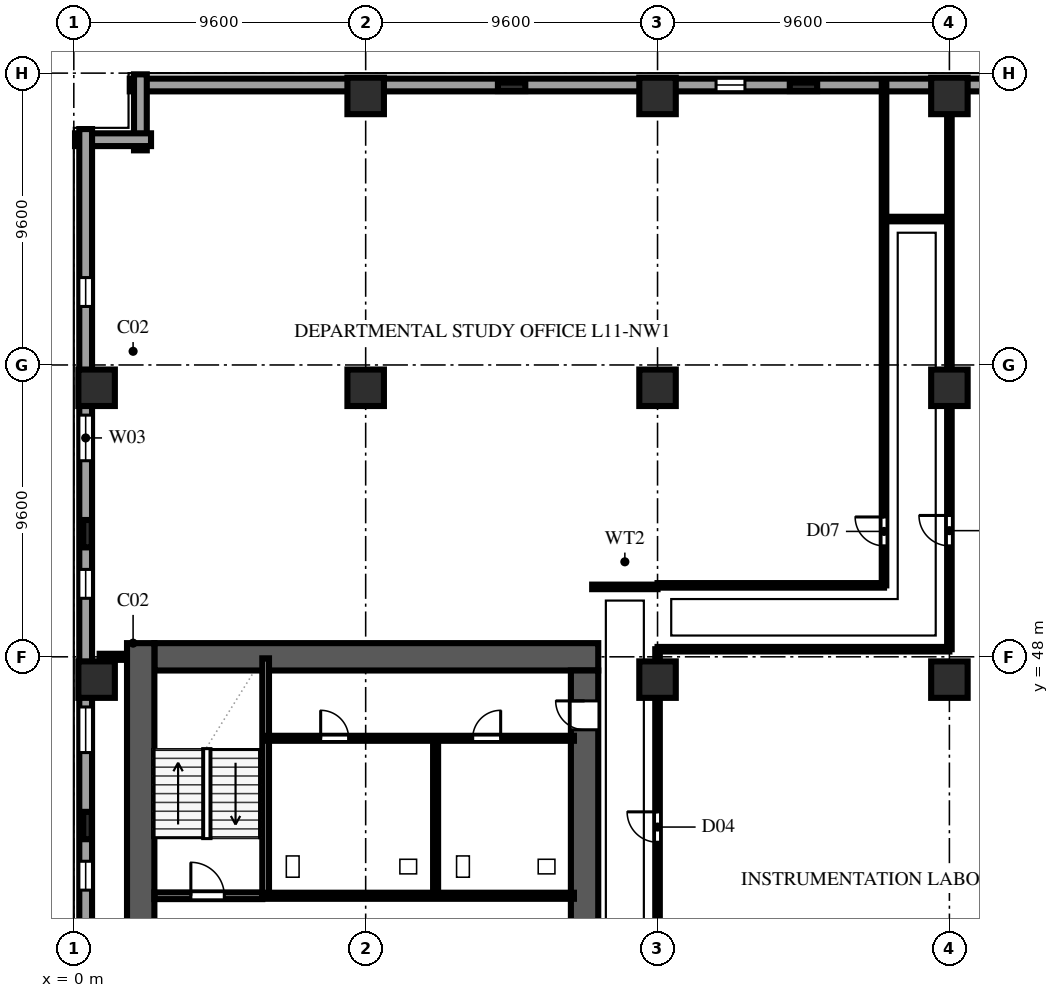
"""IFC4 building model, lengths in metres.
Left out: names, types, materials, properties, quantities, classifications, styles, units other than length and angle.
Written with IfcOpenShell. Run it as: python <this file> out.ifc"""

import sys

from ifc_helpers import new_model, si_unit, direction, frame, frame_2d, origin, origin_2d, place, context, subcontext, project, spatial, rectangle, extrude, element, fill, save


model = new_model("IFC4")
c1 = context("Model", 3, precision=1e-05, world=origin(), true_north=direction((0.0, 1.0)))
c2 = subcontext(c1, "Body", "Model", "MODEL_VIEW")
j1 = project(units=[si_unit("LENGTHUNIT", "METRE"), si_unit("PLANEANGLEUNIT", "RADIAN")], contexts=[c1])
p1 = place(None, origin())
s1 = spatial("IfcSite", under=j1, at=p1, CompositionType="ELEMENT")
p2 = place(p1, origin())
s2 = spatial("IfcBuilding", under=s1, at=p2, CompositionType="ELEMENT")
p3 = place(p2, frame((0.0, 0.0, 47.0)))
s3 = spatial("IfcBuildingStorey", under=s2, at=p3, CompositionType="ELEMENT", Elevation=47.0)
p4 = place(p3, frame((2.65, 48.0, 0.0), z_axis=(0.0, 0.0, 1.0), x_axis=(1.0, 0.0, 0.0)))
e1 = element("IfcWall", 1, at=p4, inside=s3, PredefinedType="SHEAR", context=c2, shape_type="SweptSolid", body=[
    extrude(rectangle(XDim=14.6, YDim=0.9, at=frame_2d((7.3, 0.0))), origin(), (0.0, 0.0, 1.0), 3.54),
])
p5 = place(p3, frame((2.2, 9.15, 0.0), z_axis=(0.0, 0.0, 1.0), x_axis=(0.0, 1.0, 0.0)))
e2 = element("IfcWall", 2, at=p5, inside=s3, PredefinedType="SHEAR", context=c2, shape_type="SweptSolid", body=[
    extrude(rectangle(XDim=39.3, YDim=0.9, at=frame_2d((19.65, 0.0))), origin(), (0.0, 0.0, 1.0), 3.54),
])
p6 = place(p3, frame((16.8, 36.4, 0.0), z_axis=(0.0, 0.0, 1.0), x_axis=(0.0, 1.0, 0.0)))
e3 = element("IfcWall", 3, at=p6, inside=s3, PredefinedType="SHEAR", context=c2, shape_type="SweptSolid", body=[
    extrude(rectangle(XDim=11.15, YDim=0.9, at=frame_2d((5.575, 0.0))), origin(), (0.0, 0.0, 1.0), 3.54),
])
p7 = place(p6, frame((9.2, 0.0, 0.0)))
e4 = element("IfcOpeningElement", 4, at=p7, cuts=e3, PredefinedType="OPENING", context=c2, shape_type="SweptSolid", body=[
    extrude(rectangle(XDim=0.95, YDim=2.15, at=frame_2d((0.475, 1.075))), frame((0.0, 0.462, 0.0), z_axis=(0.0, -1.0, 0.0), x_axis=(1.0, 0.0, 0.0)), (0.0, 0.0, 1.0), 0.924),
])
for number, where, z_axis, x_axis in (
    (5, (0.75, 47.25, 0.0), (0.0, 0.0, 1.0), (1.0, 0.0, 0.0)),
    (6, (0.75, 56.85, 0.0), (0.0, 0.0, 1.0), (1.0, 0.0, 0.0)),
    (7, (9.6, 56.85, 0.0), (0.0, 0.0, 1.0), (1.0, 0.0, 0.0)),
    (8, (9.6, 66.45, 0.0), (0.0, 0.0, 1.0), (1.0, 0.0, 0.0)),
    (9, (19.2, 47.25, 0.0), (0.0, 0.0, 1.0), (1.0, 0.0, 0.0)),
    (10, (19.2, 56.85, 0.0), (0.0, 0.0, 1.0), (1.0, 0.0, 0.0)),
    (11, (19.2, 66.45, 0.0), (0.0, 0.0, 1.0), (1.0, 0.0, 0.0)),
    (12, (28.8, 47.25, 0.0), (0.0, 0.0, 1.0), (1.0, 0.0, 0.0)),
    (13, (28.8, 56.85, 0.0), (0.0, 0.0, 1.0), (1.0, 0.0, 0.0)),
    (14, (28.8, 66.45, 0.0), (0.0, 0.0, 1.0), (1.0, 0.0, 0.0)),
):
    element("IfcColumn", number, at=place(p3, frame(where, z_axis=z_axis, x_axis=x_axis)), inside=s3, PredefinedType="COLUMN", context=c2, shape_type="SweptSolid", body=[
        extrude(rectangle(XDim=1.2, YDim=1.2, at=origin_2d()), origin(), (0.0, 0.0, 1.0), 3.8),
    ])
for number, where, z_axis, x_axis in (
    (15, (0.45, 42.45, 0.0), (0.0, 0.0, 1.0), (0.0, 1.0, 0.0)),
    (16, (0.45, 52.05, 0.0), (0.0, 0.0, 1.0), (0.0, 1.0, 0.0)),
    (17, (14.4, 66.75, 0.0), (0.0, 0.0, 1.0), (1.0, 0.0, 0.0)),
    (18, (24.0, 66.75, 0.0), (0.0, 0.0, 1.0), (1.0, 0.0, 0.0)),
):
    element("IfcColumn", number, at=place(p3, frame(where, z_axis=z_axis, x_axis=x_axis)), inside=s3, PredefinedType="PILASTER", context=c2, shape_type="SweptSolid", body=[
        extrude(rectangle(XDim=0.9, YDim=0.28, at=origin_2d()), origin(), (0.0, 0.0, 1.0), 3.8),
    ])
p8 = place(p3, frame((36.56, 66.81, 0.0), z_axis=(0.0, 0.0, 1.0), x_axis=(-1.0, 0.0, 0.0)))
e19 = element("IfcWall", 19, at=p8, inside=s3, PredefinedType="SOLIDWALL", context=c2, shape_type="SweptSolid", body=[
    extrude(rectangle(XDim=34.72, YDim=0.42, at=frame_2d((17.36, 0.0))), origin(), (0.0, 0.0, 1.0), 3.54),
])
p9 = place(p8, frame((4.885, 0.0, 0.9)))
e20 = element("IfcOpeningElement", 20, at=p9, cuts=e19, PredefinedType="OPENING", context=c2, shape_type="SweptSolid", body=[
    extrude(rectangle(XDim=0.95, YDim=1.85, at=frame_2d((0.475, 0.925))), frame((0.0, 0.222, 0.0), z_axis=(0.0, -1.0, 0.0), x_axis=(1.0, 0.0, 0.0)), (0.0, 0.0, 1.0), 0.444),
])
p10 = place(p8, frame((14.485, 0.0, 0.9)))
e21 = element("IfcOpeningElement", 21, at=p10, cuts=e19, PredefinedType="OPENING", context=c2, shape_type="SweptSolid", body=[
    extrude(rectangle(XDim=0.95, YDim=1.85, at=frame_2d((0.475, 0.925))), frame((0.0, 0.222, 0.0), z_axis=(0.0, -1.0, 0.0), x_axis=(1.0, 0.0, 0.0)), (0.0, 0.0, 1.0), 0.444),
])
for number, where, z_axis, x_axis in (
    (22, (2.19, 67.16, 0.0), (0.0, 0.0, 1.0), (0.0, -1.0, 0.0)),
    (23, (2.54, 65.01, 0.0), (0.0, 0.0, 1.0), (-1.0, 0.0, 0.0)),
):
    element("IfcWall", number, at=place(p3, frame(where, z_axis=z_axis, x_axis=x_axis)), inside=s3, PredefinedType="SOLIDWALL", context=c2, shape_type="SweptSolid", body=[
        extrude(rectangle(XDim=2.5, YDim=0.42, at=frame_2d((1.25, 0.0))), origin(), (0.0, 0.0, 1.0), 3.54),
    ])
p11 = place(p3, frame((0.39, 65.36, 0.0), z_axis=(0.0, 0.0, 1.0), x_axis=(0.0, -1.0, 0.0)))
e24 = element("IfcWall", 24, at=p11, inside=s3, PredefinedType="SOLIDWALL", context=c2, shape_type="SweptSolid", body=[
    extrude(rectangle(XDim=63.52, YDim=0.42, at=frame_2d((31.76, 0.0))), origin(), (0.0, 0.0, 1.0), 3.54),
])
p12 = place(p11, frame((4.885, 0.0, 0.9)))
e25 = element("IfcOpeningElement", 25, at=p12, cuts=e24, PredefinedType="OPENING", context=c2, shape_type="SweptSolid", body=[
    extrude(rectangle(XDim=0.95, YDim=1.85, at=frame_2d((0.475, 0.925))), frame((0.0, 0.222, 0.0), z_axis=(0.0, -1.0, 0.0), x_axis=(1.0, 0.0, 0.0)), (0.0, 0.0, 1.0), 0.444),
])
p13 = place(p11, frame((9.41, 0.0, 0.9)))
e26 = element("IfcOpeningElement", 26, at=p13, cuts=e24, PredefinedType="OPENING", context=c2, shape_type="SweptSolid", body=[
    extrude(rectangle(XDim=1.5, YDim=1.85, at=frame_2d((0.75, 0.925))), frame((0.0, 0.222, 0.0), z_axis=(0.0, -1.0, 0.0), x_axis=(1.0, 0.0, 0.0)), (0.0, 0.0, 1.0), 0.444),
])
p14 = place(p11, frame((14.485, 0.0, 0.9)))
e27 = element("IfcOpeningElement", 27, at=p14, cuts=e24, PredefinedType="OPENING", context=c2, shape_type="SweptSolid", body=[
    extrude(rectangle(XDim=0.95, YDim=1.85, at=frame_2d((0.475, 0.925))), frame((0.0, 0.222, 0.0), z_axis=(0.0, -1.0, 0.0), x_axis=(1.0, 0.0, 0.0)), (0.0, 0.0, 1.0), 0.444),
])
p15 = place(p11, frame((19.01, 0.0, 0.9)))
e28 = element("IfcOpeningElement", 28, at=p15, cuts=e24, PredefinedType="OPENING", context=c2, shape_type="SweptSolid", body=[
    extrude(rectangle(XDim=1.5, YDim=1.85, at=frame_2d((0.75, 0.925))), frame((0.0, 0.222, 0.0), z_axis=(0.0, -1.0, 0.0), x_axis=(1.0, 0.0, 0.0)), (0.0, 0.0, 1.0), 0.444),
])
p16 = place(p11, frame((24.085, 0.0, 0.9)))
e29 = element("IfcOpeningElement", 29, at=p16, cuts=e24, PredefinedType="OPENING", context=c2, shape_type="SweptSolid", body=[
    extrude(rectangle(XDim=0.95, YDim=1.85, at=frame_2d((0.475, 0.925))), frame((0.0, 0.222, 0.0), z_axis=(0.0, -1.0, 0.0), x_axis=(1.0, 0.0, 0.0)), (0.0, 0.0, 1.0), 0.444),
])
p17 = place(p11, frame((28.61, 0.0, 0.9)))
e30 = element("IfcOpeningElement", 30, at=p17, cuts=e24, PredefinedType="OPENING", context=c2, shape_type="SweptSolid", body=[
    extrude(rectangle(XDim=1.5, YDim=1.85, at=frame_2d((0.75, 0.925))), frame((0.0, 0.222, 0.0), z_axis=(0.0, -1.0, 0.0), x_axis=(1.0, 0.0, 0.0)), (0.0, 0.0, 1.0), 0.444),
])
p18 = place(p11, frame((33.685, 0.0, 0.9)))
e31 = element("IfcOpeningElement", 31, at=p18, cuts=e24, PredefinedType="OPENING", context=c2, shape_type="SweptSolid", body=[
    extrude(rectangle(XDim=0.95, YDim=1.85, at=frame_2d((0.475, 0.925))), frame((0.0, 0.222, 0.0), z_axis=(0.0, -1.0, 0.0), x_axis=(1.0, 0.0, 0.0)), (0.0, 0.0, 1.0), 0.444),
])
p19 = place(p11, frame((38.21, 0.0, 0.9)))
e32 = element("IfcOpeningElement", 32, at=p19, cuts=e24, PredefinedType="OPENING", context=c2, shape_type="SweptSolid", body=[
    extrude(rectangle(XDim=1.5, YDim=1.85, at=frame_2d((0.75, 0.925))), frame((0.0, 0.222, 0.0), z_axis=(0.0, -1.0, 0.0), x_axis=(1.0, 0.0, 0.0)), (0.0, 0.0, 1.0), 0.444),
])
p20 = place(p11, frame((43.285, 0.0, 0.9)))
e33 = element("IfcOpeningElement", 33, at=p20, cuts=e24, PredefinedType="OPENING", context=c2, shape_type="SweptSolid", body=[
    extrude(rectangle(XDim=0.95, YDim=1.85, at=frame_2d((0.475, 0.925))), frame((0.0, 0.222, 0.0), z_axis=(0.0, -1.0, 0.0), x_axis=(1.0, 0.0, 0.0)), (0.0, 0.0, 1.0), 0.444),
])
p21 = place(p11, frame((47.81, 0.0, 0.9)))
e34 = element("IfcOpeningElement", 34, at=p21, cuts=e24, PredefinedType="OPENING", context=c2, shape_type="SweptSolid", body=[
    extrude(rectangle(XDim=1.5, YDim=1.85, at=frame_2d((0.75, 0.925))), frame((0.0, 0.222, 0.0), z_axis=(0.0, -1.0, 0.0), x_axis=(1.0, 0.0, 0.0)), (0.0, 0.0, 1.0), 0.444),
])
p22 = place(p11, frame((52.885, 0.0, 0.9)))
e35 = element("IfcOpeningElement", 35, at=p22, cuts=e24, PredefinedType="OPENING", context=c2, shape_type="SweptSolid", body=[
    extrude(rectangle(XDim=0.95, YDim=1.85, at=frame_2d((0.475, 0.925))), frame((0.0, 0.222, 0.0), z_axis=(0.0, -1.0, 0.0), x_axis=(1.0, 0.0, 0.0)), (0.0, 0.0, 1.0), 0.444),
])
p23 = place(p3, frame((2.65, 40.14, 0.0), z_axis=(0.0, 0.0, 1.0), x_axis=(1.0, 0.0, 0.0)))
e36 = element("IfcWall", 36, at=p23, inside=s3, PredefinedType="SOLIDWALL", context=c2, shape_type="SweptSolid", body=[
    extrude(rectangle(XDim=3.55, YDim=0.22, at=frame_2d((1.775, 0.0))), origin(), (0.0, 0.0, 1.0), 3.54),
])
p24 = place(p23, frame((1.2, 0.0, 0.0)))
e37 = element("IfcOpeningElement", 37, at=p24, cuts=e36, PredefinedType="OPENING", context=c2, shape_type="SweptSolid", body=[
    extrude(rectangle(XDim=1.1, YDim=2.2, at=frame_2d((0.55, 1.1))), frame((0.0, 0.122, 0.0), z_axis=(0.0, -1.0, 0.0), x_axis=(1.0, 0.0, 0.0)), (0.0, 0.0, 1.0), 0.244),
])
p25 = place(p3, frame((6.31, 40.14, 0.0), z_axis=(0.0, 0.0, 1.0), x_axis=(0.0, 1.0, 0.0)))
e38 = element("IfcWall", 38, at=p25, inside=s3, PredefinedType="SOLIDWALL", context=c2, shape_type="SweptSolid", body=[
    extrude(rectangle(XDim=7.81, YDim=0.22, at=frame_2d((3.905, 0.0))), origin(), (0.0, 0.0, 1.0), 3.54),
])
p26 = place(p3, frame((6.32, 40.14, 0.0), z_axis=(0.0, 0.0, 1.0), x_axis=(1.0, 0.0, 0.0)))
e39 = element("IfcWall", 39, at=p26, inside=s3, PredefinedType="SOLIDWALL", context=c2, shape_type="SweptSolid", body=[
    extrude(rectangle(XDim=10.13, YDim=0.2, at=frame_2d((5.065, 0.0))), origin(), (0.0, 0.0, 1.0), 3.54),
])
p27 = place(p3, frame((6.32, 45.32, 0.0), z_axis=(0.0, 0.0, 1.0), x_axis=(1.0, 0.0, 0.0)))
e40 = element("IfcWall", 40, at=p27, inside=s3, PredefinedType="PLUMBINGWALL", context=c2, shape_type="SweptSolid", body=[
    extrude(rectangle(XDim=10.13, YDim=0.165, at=frame_2d((5.065, 0.0))), origin(), (0.0, 0.0, 1.0), 3.54),
])
p28 = place(p27, frame((1.8, 0.0, 0.0)))
e41 = element("IfcOpeningElement", 41, at=p28, cuts=e40, PredefinedType="OPENING", context=c2, shape_type="SweptSolid", body=[
    extrude(rectangle(XDim=0.92, YDim=2.15, at=frame_2d((0.46, 1.075))), frame((0.0, 0.094, 0.0), z_axis=(0.0, -1.0, 0.0), x_axis=(1.0, 0.0, 0.0)), (0.0, 0.0, 1.0), 0.189),
])
p29 = place(p27, frame((6.8, 0.0, 0.0)))
e42 = element("IfcOpeningElement", 42, at=p29, cuts=e40, PredefinedType="OPENING", context=c2, shape_type="SweptSolid", body=[
    extrude(rectangle(XDim=0.92, YDim=2.15, at=frame_2d((0.46, 1.075))), frame((0.0, 0.094, 0.0), z_axis=(0.0, -1.0, 0.0), x_axis=(1.0, 0.0, 0.0)), (0.0, 0.0, 1.0), 0.189),
])
p30 = place(p3, frame((11.9, 40.4, 0.0), z_axis=(0.0, 0.0, 1.0), x_axis=(0.0, 1.0, 0.0)))
e43 = element("IfcWall", 43, at=p30, inside=s3, PredefinedType="PLUMBINGWALL", context=c2, shape_type="SweptSolid", body=[
    extrude(rectangle(XDim=4.92, YDim=0.165, at=frame_2d((2.46, 0.0))), origin(), (0.0, 0.0, 1.0), 3.54),
])
p31 = place(p3, frame((0.85, 48.0, 0.0), z_axis=(0.0, 0.0, 1.0), x_axis=(1.0, 0.0, 0.0)))
e44 = element("IfcWall", 44, at=p31, inside=s3, PredefinedType="SOLIDWALL", context=c2, shape_type="SweptSolid", body=[
    extrude(rectangle(XDim=0.895, YDim=0.2, at=frame_2d((0.448, 0.0))), origin(), (0.0, 0.0, 1.0), 3.54),
])
p32 = place(p3, frame((17.05, 50.3, 0.0), z_axis=(0.0, 0.0, 1.0), x_axis=(1.0, 0.0, 0.0)))
e45 = element("IfcWall", 45, at=p32, inside=s3, PredefinedType="PARTITIONING", context=c2, shape_type="SweptSolid", body=[
    extrude(rectangle(XDim=2.15, YDim=0.15, at=frame_2d((1.075, 0.0))), origin(), (0.0, 0.0, 1.0), 3.54),
])
p33 = place(p3, frame((19.2, 33.05, 0.0), z_axis=(0.0, 0.0, 1.0), x_axis=(0.0, 1.0, 0.0)))
e46 = element("IfcWall", 46, at=p33, inside=s3, PredefinedType="PARTITIONING", context=c2, shape_type="SweptSolid", body=[
    extrude(rectangle(XDim=15.2, YDim=0.15, at=frame_2d((7.6, 0.0))), origin(), (0.0, 0.0, 1.0), 3.184),
])
p34 = place(p33, frame((8.85, 0.0, 0.0)))
e47 = element("IfcOpeningElement", 47, at=p34, cuts=e46, PredefinedType="OPENING", context=c2, shape_type="SweptSolid", body=[
    extrude(rectangle(XDim=1.0, YDim=2.2, at=frame_2d((0.5, 1.1))), frame((0.0, 0.087, 0.0), z_axis=(0.0, -1.0, 0.0), x_axis=(1.0, 0.0, 0.0)), (0.0, 0.0, 1.0), 0.174),
])
p35 = place(p3, frame((19.2, 48.25, 0.0), z_axis=(0.0, 0.0, 1.0), x_axis=(1.0, 0.0, 0.0)))
e48 = element("IfcWall", 48, at=p35, inside=s3, PredefinedType="PARTITIONING", context=c2, shape_type="SweptSolid", body=[
    extrude(rectangle(XDim=9.6, YDim=0.15, at=frame_2d((4.8, 0.0))), origin(), (0.0, 0.0, 1.0), 3.54),
])
p36 = place(p3, frame((19.2, 50.35, 0.0), z_axis=(0.0, 0.0, 1.0), x_axis=(1.0, 0.0, 0.0)))
e49 = element("IfcWall", 49, at=p36, inside=s3, PredefinedType="PARTITIONING", context=c2, shape_type="SweptSolid", body=[
    extrude(rectangle(XDim=7.45, YDim=0.15, at=frame_2d((3.725, 0.0))), origin(), (0.0, 0.0, 1.0), 3.54),
])
p37 = place(p3, frame((26.65, 62.4, 0.0), z_axis=(0.0, 0.0, 1.0), x_axis=(1.0, 0.0, 0.0)))
e50 = element("IfcWall", 50, at=p37, inside=s3, PredefinedType="PARTITIONING", context=c2, shape_type="SweptSolid", body=[
    extrude(rectangle(XDim=2.15, YDim=0.15, at=frame_2d((1.075, 0.0))), origin(), (0.0, 0.0, 1.0), 3.54),
])
p38 = place(p3, frame((28.8, 48.25, 0.0), z_axis=(0.0, 0.0, 1.0), x_axis=(0.0, 1.0, 0.0)))
e51 = element("IfcWall", 51, at=p38, inside=s3, PredefinedType="PARTITIONING", context=c2, shape_type="SweptSolid", body=[
    extrude(rectangle(XDim=18.2, YDim=0.15, at=frame_2d((9.1, 0.0))), origin(), (0.0, 0.0, 1.0), 3.184),
])
p39 = place(p38, frame((3.4, 0.0, 0.0)))
e52 = element("IfcOpeningElement", 52, at=p39, cuts=e51, PredefinedType="OPENING", context=c2, shape_type="SweptSolid", body=[
    extrude(rectangle(XDim=1.0, YDim=2.2, at=frame_2d((0.5, 1.1))), frame((0.0, 0.087, 0.0), z_axis=(0.0, -1.0, 0.0), x_axis=(1.0, 0.0, 0.0)), (0.0, 0.0, 1.0), 0.174),
])
p40 = place(p3, frame((28.8, 66.45, 0.0), z_axis=(0.0, 0.0, 1.0), x_axis=(0.0, 1.0, 0.0)))
e53 = element("IfcWall", 53, at=p40, inside=s3, PredefinedType="PARTITIONING", context=c2, shape_type="SweptSolid", body=[
    extrude(rectangle(XDim=0.53, YDim=0.15, at=frame_2d((0.265, 0.0))), origin(), (0.0, 0.0, 1.0), 3.54),
])
p41 = place(p3, frame((26.65, 50.35, 0.0), z_axis=(0.0, 0.0, 1.0), x_axis=(0.0, 1.0, 0.0)))
e54 = element("IfcWall", 54, at=p41, inside=s3, PredefinedType="PARTITIONING", context=c2, shape_type="SweptSolid", body=[
    extrude(rectangle(XDim=16.63, YDim=0.15, at=frame_2d((8.315, 0.0))), origin(), (0.0, 0.0, 1.0), 3.54),
])
p42 = place(p41, frame((1.3, 0.0, 0.0)))
e55 = element("IfcOpeningElement", 55, at=p42, cuts=e54, PredefinedType="OPENING", context=c2, shape_type="SweptSolid", body=[
    extrude(rectangle(XDim=0.95, YDim=2.15, at=frame_2d((0.475, 1.075))), frame((0.0, 0.087, 0.0), z_axis=(0.0, -1.0, 0.0), x_axis=(1.0, 0.0, 0.0)), (0.0, 0.0, 1.0), 0.174),
])
p43 = place(p10, origin())
e56 = element("IfcWindow", 56, at=p43, inside=s3, PartitioningType="SINGLE_PANEL", PredefinedType="WINDOW", context=c2, shape_type="SweptSolid", body=[
    extrude(rectangle(XDim=0.95, YDim=1.85, at=frame_2d((0.475, 0.925))), frame((0.0, 0.11, 0.0), z_axis=(0.0, -1.0, 0.0), x_axis=(1.0, 0.0, 0.0)), (0.0, 0.0, 1.0), 0.06),
])
fill(e21, e56)
p44 = place(p12, origin())
e57 = element("IfcWindow", 57, at=p44, inside=s3, PartitioningType="SINGLE_PANEL", PredefinedType="WINDOW", context=c2, shape_type="SweptSolid", body=[
    extrude(rectangle(XDim=0.95, YDim=1.85, at=frame_2d((0.475, 0.925))), frame((0.0, 0.11, 0.0), z_axis=(0.0, -1.0, 0.0), x_axis=(1.0, 0.0, 0.0)), (0.0, 0.0, 1.0), 0.06),
])
fill(e25, e57)
p45 = place(p13, origin())
e58 = element("IfcWindow", 58, at=p45, inside=s3, PartitioningType="DOUBLE_PANEL_VERTICAL", PredefinedType="WINDOW", context=c2, shape_type="SweptSolid", body=[
    extrude(rectangle(XDim=1.5, YDim=1.85, at=frame_2d((0.75, 0.925))), frame((0.0, 0.11, 0.0), z_axis=(0.0, -1.0, 0.0), x_axis=(1.0, 0.0, 0.0)), (0.0, 0.0, 1.0), 0.06),
])
fill(e26, e58)
p46 = place(p14, origin())
e59 = element("IfcWindow", 59, at=p46, inside=s3, PartitioningType="SINGLE_PANEL", PredefinedType="WINDOW", context=c2, shape_type="SweptSolid", body=[
    extrude(rectangle(XDim=0.95, YDim=1.85, at=frame_2d((0.475, 0.925))), frame((0.0, 0.11, 0.0), z_axis=(0.0, -1.0, 0.0), x_axis=(1.0, 0.0, 0.0)), (0.0, 0.0, 1.0), 0.06),
])
fill(e27, e59)
p47 = place(p15, origin())
e60 = element("IfcWindow", 60, at=p47, inside=s3, PartitioningType="DOUBLE_PANEL_VERTICAL", PredefinedType="WINDOW", context=c2, shape_type="SweptSolid", body=[
    extrude(rectangle(XDim=1.5, YDim=1.85, at=frame_2d((0.75, 0.925))), frame((0.0, 0.11, 0.0), z_axis=(0.0, -1.0, 0.0), x_axis=(1.0, 0.0, 0.0)), (0.0, 0.0, 1.0), 0.06),
])
fill(e28, e60)
p48 = place(p16, origin())
e61 = element("IfcWindow", 61, at=p48, inside=s3, PartitioningType="SINGLE_PANEL", PredefinedType="WINDOW", context=c2, shape_type="SweptSolid", body=[
    extrude(rectangle(XDim=0.95, YDim=1.85, at=frame_2d((0.475, 0.925))), frame((0.0, 0.11, 0.0), z_axis=(0.0, -1.0, 0.0), x_axis=(1.0, 0.0, 0.0)), (0.0, 0.0, 1.0), 0.06),
])
fill(e29, e61)
p49 = place(p24, origin())
e62 = element("IfcDoor", 62, at=p49, inside=s3, OperationType="SINGLE_SWING_LEFT", PredefinedType="DOOR", context=c2, shape_type="SweptSolid", body=[
    extrude(rectangle(XDim=1.1, YDim=2.2, at=frame_2d((0.55, 1.1))), frame((0.0, 0.025, 0.0), z_axis=(0.0, -1.0, 0.0), x_axis=(1.0, 0.0, 0.0)), (0.0, 0.0, 1.0), 0.05),
])
fill(e37, e62)
p50 = place(p7, origin())
e63 = element("IfcDoor", 63, at=p50, inside=s3, OperationType="SINGLE_SWING_RIGHT", PredefinedType="DOOR", context=c2, shape_type="SweptSolid", body=[
    extrude(rectangle(XDim=0.95, YDim=2.15, at=frame_2d((0.475, 1.075))), frame((0.0, 0.025, 0.0), z_axis=(0.0, -1.0, 0.0), x_axis=(1.0, 0.0, 0.0)), (0.0, 0.0, 1.0), 0.05),
])
fill(e4, e63)
p51 = place(p28, origin())
e64 = element("IfcDoor", 64, at=p51, inside=s3, OperationType="SINGLE_SWING_LEFT", PredefinedType="DOOR", context=c2, shape_type="SweptSolid", body=[
    extrude(rectangle(XDim=0.92, YDim=2.15, at=frame_2d((0.46, 1.075))), frame((0.0, 0.025, 0.0), z_axis=(0.0, -1.0, 0.0), x_axis=(1.0, 0.0, 0.0)), (0.0, 0.0, 1.0), 0.05),
])
fill(e41, e64)
p52 = place(p29, origin())
e65 = element("IfcDoor", 65, at=p52, inside=s3, OperationType="SINGLE_SWING_RIGHT", PredefinedType="DOOR", context=c2, shape_type="SweptSolid", body=[
    extrude(rectangle(XDim=0.92, YDim=2.15, at=frame_2d((0.46, 1.075))), frame((0.0, 0.025, 0.0), z_axis=(0.0, -1.0, 0.0), x_axis=(1.0, 0.0, 0.0)), (0.0, 0.0, 1.0), 0.05),
])
fill(e42, e65)
p53 = place(p34, origin())
e66 = element("IfcDoor", 66, at=p53, inside=s3, OperationType="SINGLE_SWING_RIGHT", PredefinedType="DOOR", context=c2, shape_type="SweptSolid", body=[
    extrude(rectangle(XDim=1.0, YDim=2.2, at=frame_2d((0.5, 1.1))), frame((0.0, 0.025, 0.0), z_axis=(0.0, -1.0, 0.0), x_axis=(1.0, 0.0, 0.0)), (0.0, 0.0, 1.0), 0.05),
])
fill(e47, e66)
p54 = place(p39, origin())
e67 = element("IfcDoor", 67, at=p54, inside=s3, OperationType="SINGLE_SWING_RIGHT", PredefinedType="DOOR", context=c2, shape_type="SweptSolid", body=[
    extrude(rectangle(XDim=1.0, YDim=2.2, at=frame_2d((0.5, 1.1))), frame((0.0, 0.025, 0.0), z_axis=(0.0, -1.0, 0.0), x_axis=(1.0, 0.0, 0.0)), (0.0, 0.0, 1.0), 0.05),
])
fill(e52, e67)
p55 = place(p42, origin())
e68 = element("IfcDoor", 68, at=p55, inside=s3, OperationType="SINGLE_SWING_RIGHT", PredefinedType="DOOR", context=c2, shape_type="SweptSolid", body=[
    extrude(rectangle(XDim=0.95, YDim=2.15, at=frame_2d((0.475, 1.075))), frame((0.0, 0.025, 0.0), z_axis=(0.0, -1.0, 0.0), x_axis=(1.0, 0.0, 0.0)), (0.0, 0.0, 1.0), 0.05),
])
fill(e55, e68)
save(model, sys.argv[1])
